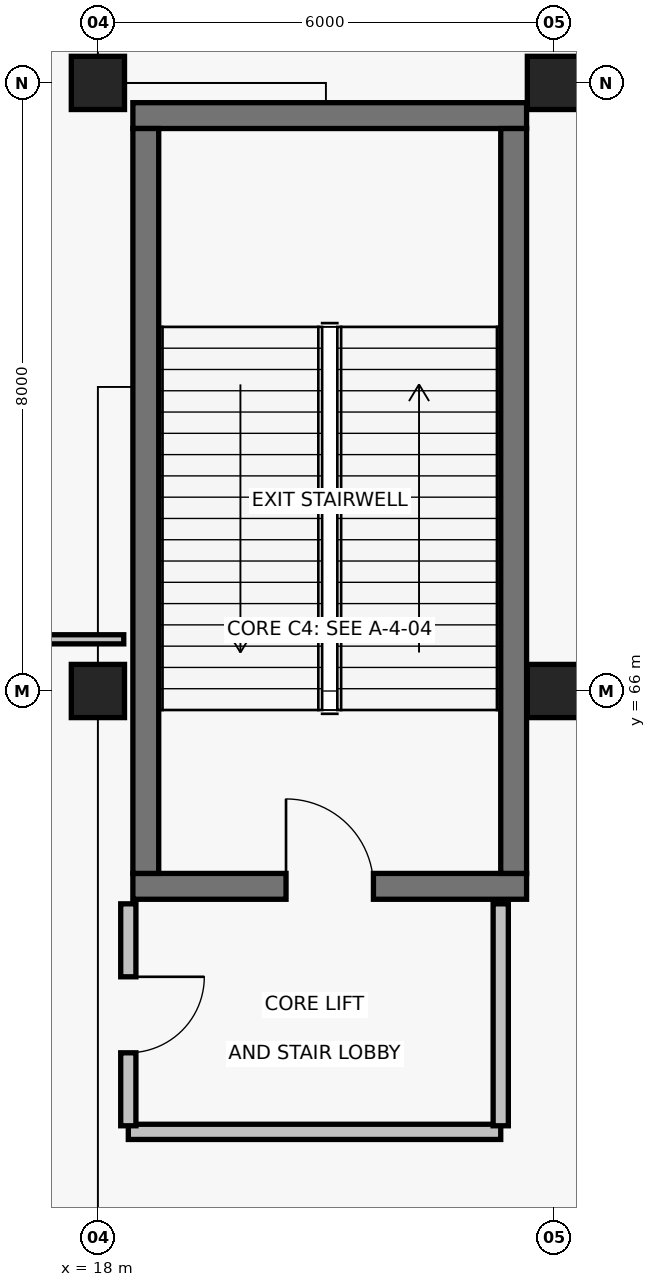
"""IFC4 building model, lengths in metres.
Left out: names, types, materials, properties, quantities, classifications, styles, units other than length and angle.
Written with IfcOpenShell. Run it as: python <this file> out.ifc"""

import sys

from ifc_helpers import new_model, si_unit, direction, frame, frame_2d, origin, origin_2d, place, context, subcontext, project, spatial, rectangle, extrude, element, fill, save


model = new_model("IFC4")
c1 = context("Model", 3, precision=1e-05, world=origin(), true_north=direction((0.0, 1.0)))
c2 = subcontext(c1, "Body", "Model", "MODEL_VIEW")
j1 = project(units=[si_unit("LENGTHUNIT", "METRE"), si_unit("PLANEANGLEUNIT", "RADIAN")], contexts=[c1])
p1 = place(None, origin())
s1 = spatial("IfcSite", under=j1, at=p1, CompositionType="ELEMENT")
p2 = place(p1, origin())
s2 = spatial("IfcBuilding", under=s1, at=p2, CompositionType="ELEMENT")
p3 = place(p2, origin())
s3 = spatial("IfcBuildingStorey", under=s2, at=p3, CompositionType="ELEMENT", Elevation=0.0)
for number, where, z_axis, x_axis in (
    (1, (18.0, 66.0, 0.0), (0.0, 0.0, 1.0), (1.0, 0.0, 0.0)),
    (2, (18.0, 74.0, 0.0), (0.0, 0.0, 1.0), (1.0, 0.0, 0.0)),
    (3, (24.0, 66.0, 0.0), (0.0, 0.0, 1.0), (1.0, 0.0, 0.0)),
    (4, (24.0, 74.0, 0.0), (0.0, 0.0, 1.0), (1.0, 0.0, 0.0)),
):
    element("IfcColumn", number, at=place(p3, frame(where, z_axis=z_axis, x_axis=x_axis)), inside=s3, PredefinedType="COLUMN", context=c2, shape_type="SweptSolid", body=[
        extrude(rectangle(XDim=0.7, YDim=0.7, at=origin_2d()), origin(), (0.0, 0.0, 1.0), 6.6),
    ])
p4 = place(p3, frame((18.46, 63.43, 0.0), z_axis=(0.0, 0.0, 1.0), x_axis=(1.0, 0.0, 0.0)))
e5 = element("IfcWall", 5, at=p4, inside=s3, PredefinedType="SHEAR", context=c2, shape_type="SweptSolid", body=[
    extrude(rectangle(XDim=5.18, YDim=0.34, at=frame_2d((2.59, 0.0))), origin(), (0.0, 0.0, 1.0), 6.32),
])
p5 = place(p4, frame((2.015, 0.0, 0.0)))
e6 = element("IfcOpeningElement", 6, at=p5, cuts=e5, PredefinedType="OPENING", context=c2, shape_type="SweptSolid", body=[
    extrude(rectangle(XDim=1.15, YDim=2.15, at=frame_2d((0.575, 1.075))), frame((0.0, 0.185, 0.0), z_axis=(0.0, -1.0, 0.0), x_axis=(1.0, 0.0, 0.0)), (0.0, 0.0, 1.0), 0.37),
])
p6 = place(p3, frame((23.64, 73.57, 0.0), z_axis=(0.0, 0.0, 1.0), x_axis=(-1.0, 0.0, 0.0)))
e7 = element("IfcWall", 7, at=p6, inside=s3, PredefinedType="SHEAR", context=c2, shape_type="SweptSolid", body=[
    extrude(rectangle(XDim=5.18, YDim=0.34, at=frame_2d((2.59, 0.0))), origin(), (0.0, 0.0, 1.0), 6.32),
])
for number, where, z_axis, x_axis in (
    (8, (18.63, 73.4, 0.0), (0.0, 0.0, 1.0), (0.0, -1.0, 0.0)),
    (9, (23.47, 63.6, 0.0), (0.0, 0.0, 1.0), (0.0, 1.0, 0.0)),
):
    element("IfcWall", number, at=place(p3, frame(where, z_axis=z_axis, x_axis=x_axis)), inside=s3, PredefinedType="SHEAR", context=c2, shape_type="SweptSolid", body=[
        extrude(rectangle(XDim=9.8, YDim=0.34, at=frame_2d((4.9, 0.0))), origin(), (0.0, 0.0, 1.0), 6.32),
    ])
p7 = place(p3, frame((18.4, 60.2, 0.0), z_axis=(0.0, 0.0, 1.0), x_axis=(1.0, 0.0, 0.0)))
e10 = element("IfcWall", 10, at=p7, inside=s3, PredefinedType="PARTITIONING", context=c2, shape_type="SweptSolid", body=[
    extrude(rectangle(XDim=4.9, YDim=0.2, at=frame_2d((2.45, 0.0))), origin(), (0.0, 0.0, 1.0), 5.607),
])
p8 = place(p3, frame((18.4, 63.2, 0.0), z_axis=(0.0, 0.0, 1.0), x_axis=(0.0, -1.0, 0.0)))
e11 = element("IfcWall", 11, at=p8, inside=s3, PredefinedType="PARTITIONING", context=c2, shape_type="SweptSolid", body=[
    extrude(rectangle(XDim=2.92, YDim=0.2, at=frame_2d((1.46, 0.0))), origin(), (0.0, 0.0, 1.0), 5.607),
])
p9 = place(p8, frame((0.96, 0.0, 0.0)))
e12 = element("IfcOpeningElement", 12, at=p9, cuts=e11, PredefinedType="OPENING", context=c2, shape_type="SweptSolid", body=[
    extrude(rectangle(XDim=1.0, YDim=2.15, at=frame_2d((0.5, 1.075))), frame((0.0, 0.115, 0.0), z_axis=(0.0, -1.0, 0.0), x_axis=(1.0, 0.0, 0.0)), (0.0, 0.0, 1.0), 0.23),
])
p10 = place(p3, frame((23.3, 60.28, 0.0), z_axis=(0.0, 0.0, 1.0), x_axis=(0.0, 1.0, 0.0)))
e13 = element("IfcWall", 13, at=p10, inside=s3, PredefinedType="PARTITIONING", context=c2, shape_type="SweptSolid", body=[
    extrude(rectangle(XDim=2.92, YDim=0.2, at=frame_2d((1.46, 0.0))), origin(), (0.0, 0.0, 1.0), 6.32),
])
p11 = place(p3, frame((18.34, 66.68, 0.0), z_axis=(0.0, 0.0, 1.0), x_axis=(-1.0, 0.0, 0.0)))
e14 = element("IfcWall", 14, at=p11, inside=s3, PredefinedType="PARTITIONING", context=c2, shape_type="SweptSolid", body=[
    extrude(rectangle(XDim=17.66, YDim=0.12, at=frame_2d((8.83, 0.0))), origin(), (0.0, 0.0, 1.0), 5.607),
])
p12 = place(p11, frame((8.23, 0.0, 0.0)))
e15 = element("IfcOpeningElement", 15, at=p12, cuts=e14, PredefinedType="OPENING", context=c2, shape_type="SweptSolid", body=[
    extrude(rectangle(XDim=1.2, YDim=2.15, at=frame_2d((0.6, 1.075))), frame((0.0, 0.075, 0.0), z_axis=(0.0, -1.0, 0.0), x_axis=(1.0, 0.0, 0.0)), (0.0, 0.0, 1.0), 0.15),
])
p13 = place(p5, origin())
e16 = element("IfcDoor", 16, at=p13, inside=s3, OperationType="SINGLE_SWING_LEFT", PredefinedType="DOOR", context=c2, shape_type="SweptSolid", body=[
    extrude(rectangle(XDim=1.15, YDim=2.15, at=frame_2d((0.575, 1.075))), frame((0.0, 0.025, 0.0), z_axis=(0.0, -1.0, 0.0), x_axis=(1.0, 0.0, 0.0)), (0.0, 0.0, 1.0), 0.05),
])
fill(e6, e16)
p14 = place(p9, origin())
e17 = element("IfcDoor", 17, at=p14, inside=s3, OperationType="SINGLE_SWING_LEFT", PredefinedType="DOOR", context=c2, shape_type="SweptSolid", body=[
    extrude(rectangle(XDim=1.0, YDim=2.15, at=frame_2d((0.5, 1.075))), frame((0.0, 0.025, 0.0), z_axis=(0.0, -1.0, 0.0), x_axis=(1.0, 0.0, 0.0)), (0.0, 0.0, 1.0), 0.05),
])
fill(e12, e17)
save(model, sys.argv[1])
